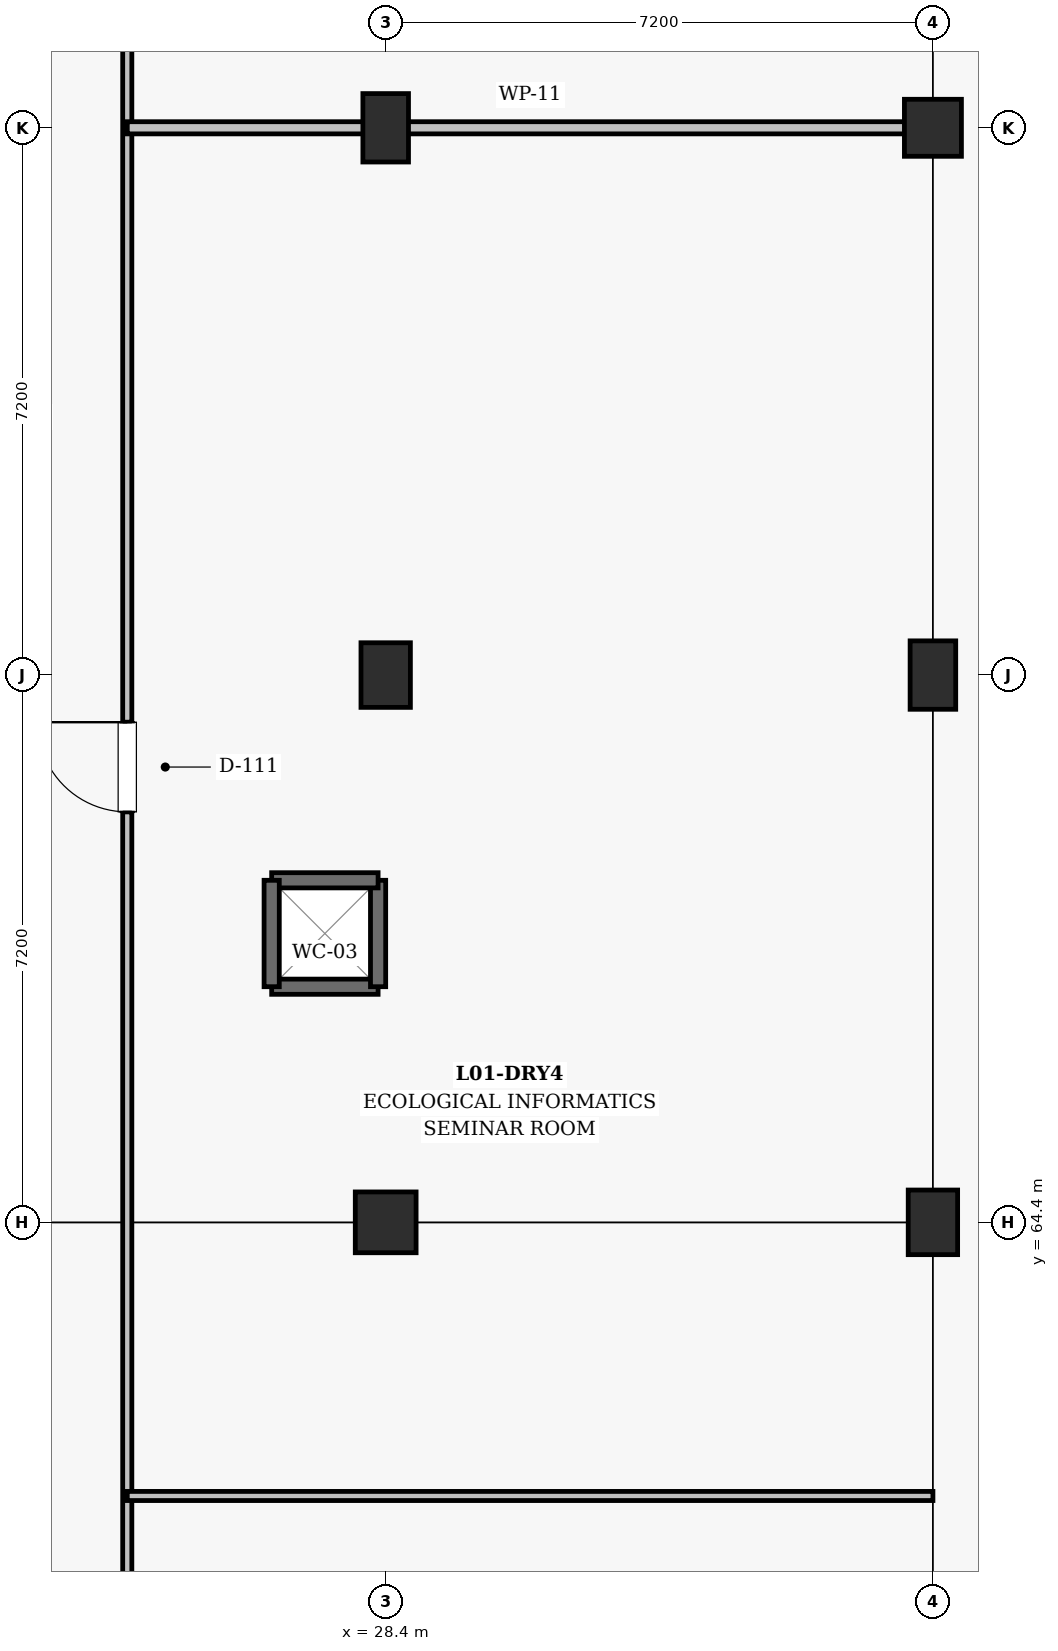
"""IFC4 building model, lengths in metres.
Left out: names, types, materials, properties, quantities, classifications, styles, units other than length and angle.
Written with IfcOpenShell. Run it as: python <this file> out.ifc"""

import sys

from ifc_helpers import new_model, si_unit, direction, frame, frame_2d, origin, origin_2d, place, context, subcontext, project, spatial, rectangle, extrude, element, fill, save


model = new_model("IFC4")
c1 = context("Model", 3, precision=1e-05, world=origin(), true_north=direction((0.0, 1.0)))
c2 = subcontext(c1, "Body", "Model", "MODEL_VIEW")
j1 = project(units=[si_unit("LENGTHUNIT", "METRE"), si_unit("PLANEANGLEUNIT", "RADIAN")], contexts=[c1])
p1 = place(None, origin())
s1 = spatial("IfcSite", under=j1, at=p1, CompositionType="ELEMENT")
p2 = place(p1, origin())
s2 = spatial("IfcBuilding", under=s1, at=p2, CompositionType="ELEMENT")
p3 = place(p2, frame((0.0, 0.0, 5.4)))
s3 = spatial("IfcBuildingStorey", under=s2, at=p3, CompositionType="ELEMENT", Elevation=5.4)
p4 = place(p3, frame((28.4, 64.4, 0.0), z_axis=(0.0, 0.0, 1.0), x_axis=(1.0, 0.0, 0.0)))
e1 = element("IfcColumn", 1, at=p4, inside=s3, PredefinedType="COLUMN", context=c2, shape_type="SweptSolid", body=[
    extrude(rectangle(XDim=0.8, YDim=0.8, at=origin_2d()), origin(), (0.0, 0.0, 1.0), 4.5),
])
p5 = place(p3, frame((28.4, 71.6, 0.0), z_axis=(0.0, 0.0, 1.0), x_axis=(1.0, 0.0, 0.0)))
e2 = element("IfcColumn", 2, at=p5, inside=s3, PredefinedType="COLUMN", context=c2, shape_type="SweptSolid", body=[
    extrude(rectangle(XDim=0.65, YDim=0.85, at=origin_2d()), origin(), (0.0, 0.0, 1.0), 4.5),
])
p6 = place(p3, frame((28.4, 78.8, 0.0), z_axis=(0.0, 0.0, 1.0), x_axis=(1.0, 0.0, 0.0)))
e3 = element("IfcColumn", 3, at=p6, inside=s3, PredefinedType="COLUMN", context=c2, shape_type="SweptSolid", body=[
    extrude(rectangle(XDim=0.6, YDim=0.9, at=origin_2d()), origin(), (0.0, 0.0, 1.0), 4.5),
])
p7 = place(p3, frame((35.6, 64.4, 0.0), z_axis=(0.0, 0.0, 1.0), x_axis=(1.0, 0.0, 0.0)))
e4 = element("IfcColumn", 4, at=p7, inside=s3, PredefinedType="COLUMN", context=c2, shape_type="SweptSolid", body=[
    extrude(rectangle(XDim=0.65, YDim=0.85, at=origin_2d()), origin(), (0.0, 0.0, 1.0), 4.5),
])
p8 = place(p3, frame((35.6, 71.6, 0.0), z_axis=(0.0, 0.0, 1.0), x_axis=(1.0, 0.0, 0.0)))
e5 = element("IfcColumn", 5, at=p8, inside=s3, PredefinedType="COLUMN", context=c2, shape_type="SweptSolid", body=[
    extrude(rectangle(XDim=0.6, YDim=0.9, at=origin_2d()), origin(), (0.0, 0.0, 1.0), 4.5),
])
p9 = place(p3, frame((35.6, 78.8, 0.0), z_axis=(0.0, 0.0, 1.0), x_axis=(1.0, 0.0, 0.0)))
e6 = element("IfcColumn", 6, at=p9, inside=s3, PredefinedType="COLUMN", context=c2, shape_type="SweptSolid", body=[
    extrude(rectangle(XDim=0.75, YDim=0.75, at=origin_2d()), origin(), (0.0, 0.0, 1.0), 4.5),
])
p10 = place(p3, frame((26.9, 67.5, 0.0), z_axis=(0.0, 0.0, 1.0), x_axis=(1.0, 0.0, 0.0)))
e7 = element("IfcWall", 7, at=p10, inside=s3, PredefinedType="SHEAR", context=c2, shape_type="SweptSolid", body=[
    extrude(rectangle(XDim=1.4, YDim=0.2, at=frame_2d((0.7, 0.0))), origin(), (0.0, 0.0, 1.0), 4.16),
])
p11 = place(p3, frame((28.3, 67.5, 0.0), z_axis=(0.0, 0.0, 1.0), x_axis=(0.0, 1.0, 0.0)))
e8 = element("IfcWall", 8, at=p11, inside=s3, PredefinedType="SHEAR", context=c2, shape_type="SweptSolid", body=[
    extrude(rectangle(XDim=1.4, YDim=0.2, at=frame_2d((0.7, 0.0))), origin(), (0.0, 0.0, 1.0), 4.16),
])
p12 = place(p3, frame((28.3, 68.9, 0.0), z_axis=(0.0, 0.0, 1.0), x_axis=(-1.0, 0.0, 0.0)))
e9 = element("IfcWall", 9, at=p12, inside=s3, PredefinedType="SHEAR", context=c2, shape_type="SweptSolid", body=[
    extrude(rectangle(XDim=1.4, YDim=0.2, at=frame_2d((0.7, 0.0))), origin(), (0.0, 0.0, 1.0), 4.16),
])
p13 = place(p3, frame((26.9, 68.9, 0.0), z_axis=(0.0, 0.0, 1.0), x_axis=(0.0, -1.0, 0.0)))
e10 = element("IfcWall", 10, at=p13, inside=s3, PredefinedType="SHEAR", context=c2, shape_type="SweptSolid", body=[
    extrude(rectangle(XDim=1.4, YDim=0.2, at=frame_2d((0.7, 0.0))), origin(), (0.0, 0.0, 1.0), 4.16),
])
p14 = place(p3, frame((25.0, 14.0, 0.0), z_axis=(0.0, 0.0, 1.0), x_axis=(0.0, 1.0, 0.0)))
e11 = element("IfcWall", 11, at=p14, inside=s3, PredefinedType="PARTITIONING", context=c2, shape_type="SweptSolid", body=[
    extrude(rectangle(XDim=88.8, YDim=0.12, at=frame_2d((44.4, 0.0))), origin(), (0.0, 0.0, 1.0), 3.38),
])
p15 = place(p14, frame((7.4, 0.0, 0.0)))
e12 = element("IfcOpeningElement", 12, at=p15, cuts=e11, PredefinedType="OPENING", context=c2, shape_type="SweptSolid", body=[
    extrude(rectangle(XDim=1.35, YDim=2.2, at=frame_2d((0.675, 1.1))), frame((0.0, 0.07, 0.0), z_axis=(0.0, -1.0, 0.0), x_axis=(1.0, 0.0, 0.0)), (0.0, 0.0, 1.0), 0.14),
])
p16 = place(p14, frame((24.5, 0.0, 0.0)))
e13 = element("IfcOpeningElement", 13, at=p16, cuts=e11, PredefinedType="OPENING", context=c2, shape_type="SweptSolid", body=[
    extrude(rectangle(XDim=1.0, YDim=2.15, at=frame_2d((0.5, 1.075))), frame((0.0, 0.07, 0.0), z_axis=(0.0, -1.0, 0.0), x_axis=(1.0, 0.0, 0.0)), (0.0, 0.0, 1.0), 0.14),
])
p17 = place(p14, frame((38.7, 0.0, 0.0)))
e14 = element("IfcOpeningElement", 14, at=p17, cuts=e11, PredefinedType="OPENING", context=c2, shape_type="SweptSolid", body=[
    extrude(rectangle(XDim=1.1, YDim=2.15, at=frame_2d((0.55, 1.075))), frame((0.0, 0.07, 0.0), z_axis=(0.0, -1.0, 0.0), x_axis=(1.0, 0.0, 0.0)), (0.0, 0.0, 1.0), 0.14),
])
p18 = place(p14, frame((55.8, 0.0, 0.0)))
e15 = element("IfcOpeningElement", 15, at=p18, cuts=e11, PredefinedType="OPENING", context=c2, shape_type="SweptSolid", body=[
    extrude(rectangle(XDim=1.18, YDim=2.2, at=frame_2d((0.59, 1.1))), frame((0.0, 0.07, 0.0), z_axis=(0.0, -1.0, 0.0), x_axis=(1.0, 0.0, 0.0)), (0.0, 0.0, 1.0), 0.14),
])
p19 = place(p14, frame((76.6, 0.0, 0.0)))
e16 = element("IfcOpeningElement", 16, at=p19, cuts=e11, PredefinedType="OPENING", context=c2, shape_type="SweptSolid", body=[
    extrude(rectangle(XDim=1.25, YDim=2.2, at=frame_2d((0.625, 1.1))), frame((0.0, 0.07, 0.0), z_axis=(0.0, -1.0, 0.0), x_axis=(1.0, 0.0, 0.0)), (0.0, 0.0, 1.0), 0.14),
])
p20 = place(p3, frame((25.0, 60.8, 0.0), z_axis=(0.0, 0.0, 1.0), x_axis=(1.0, 0.0, 0.0)))
e17 = element("IfcWall", 17, at=p20, inside=s3, PredefinedType="PARTITIONING", context=c2, shape_type="SweptSolid", body=[
    extrude(rectangle(XDim=10.6, YDim=0.12, at=frame_2d((5.3, 0.0))), origin(), (0.0, 0.0, 1.0), 3.48),
])
p21 = place(p3, frame((25.0, 78.8, 0.0), z_axis=(0.0, 0.0, 1.0), x_axis=(1.0, 0.0, 0.0)))
e18 = element("IfcWall", 18, at=p21, inside=s3, PredefinedType="PARTITIONING", context=c2, shape_type="SweptSolid", body=[
    extrude(rectangle(XDim=10.6, YDim=0.16, at=frame_2d((5.3, 0.0))), origin(), (0.0, 0.0, 1.0), 3.46),
])
p22 = place(p18, origin())
e19 = element("IfcDoor", 19, at=p22, inside=s3, OperationType="SINGLE_SWING_RIGHT", PredefinedType="DOOR", context=c2, shape_type="SweptSolid", body=[
    extrude(rectangle(XDim=1.18, YDim=2.2, at=frame_2d((0.59, 1.1))), frame((0.0, 0.025, 0.0), z_axis=(0.0, -1.0, 0.0), x_axis=(1.0, 0.0, 0.0)), (0.0, 0.0, 1.0), 0.05),
])
fill(e15, e19)
save(model, sys.argv[1])
